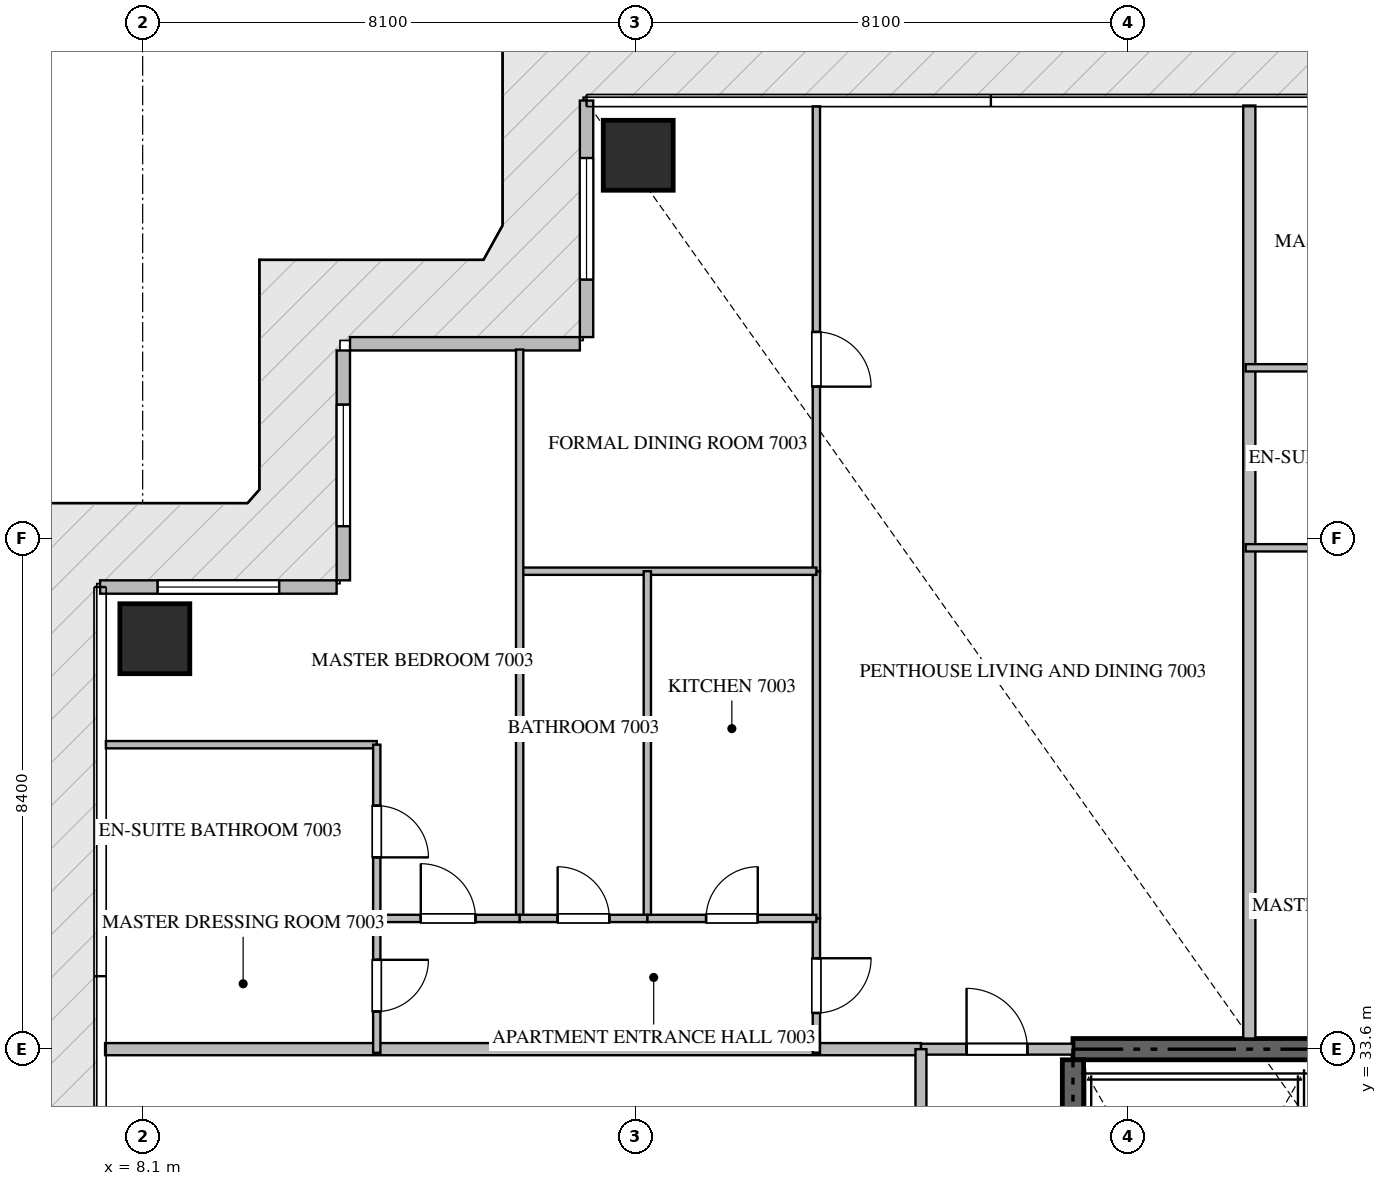
"""IFC4 building model, lengths in metres.
Left out: names, types, materials, properties, quantities, classifications, styles, units other than length and angle.
Written with IfcOpenShell. Run it as: python <this file> out.ifc"""

import sys

from ifc_helpers import new_model, si_unit, direction, frame, frame_2d, origin, origin_2d, place, context, subcontext, project, spatial, rectangle, extrude, source, transform, mapped, element, fill, save


model = new_model("IFC4")
c1 = context("Model", 3, precision=1e-05, world=origin(), true_north=direction((0.0, 1.0)))
c2 = subcontext(c1, "Body", "Model", "MODEL_VIEW")
j1 = project(units=[si_unit("LENGTHUNIT", "METRE"), si_unit("PLANEANGLEUNIT", "RADIAN")], contexts=[c1])
p1 = place(None, origin())
s1 = spatial("IfcSite", under=j1, at=p1, CompositionType="ELEMENT")
p2 = place(p1, origin())
s2 = spatial("IfcBuilding", under=s1, at=p2, CompositionType="ELEMENT")
p3 = place(p2, frame((0.0, 0.0, 279.75)))
s3 = spatial("IfcBuildingStorey", under=s2, at=p3, CompositionType="ELEMENT", Elevation=279.75)
p4 = place(p3, frame((41.4, 33.6, -0.26), z_axis=(0.0, 0.0, 1.0), x_axis=(-1.0, 0.0, 0.0)))
e1 = element("IfcWall", 1, at=p4, inside=s3, PredefinedType="SHEAR", context=c2, shape_type="SweptSolid", body=[
    extrude(rectangle(XDim=18.0, YDim=0.35, at=frame_2d((9.0, 0.0))), origin(), (0.0, 0.0, 1.0), 3.848),
])
p5 = place(p3, frame((23.4, 24.25, -0.26), z_axis=(0.0, 0.0, 1.0), x_axis=(0.0, 1.0, 0.0)))
e2 = element("IfcWall", 2, at=p5, inside=s3, PredefinedType="SHEAR", context=c2, shape_type="SweptSolid", body=[
    extrude(rectangle(XDim=9.175, YDim=0.35, at=frame_2d((4.587, 0.0))), origin(), (0.0, 0.0, 1.0), 3.848),
])
m1 = source(origin(), c2, "Body", "SweptSolid", [
    extrude(rectangle(XDim=1.15, YDim=1.15, at=origin_2d()), origin(), (0.0, 0.0, 1.0), 3.85),
])
for number, where, z_axis, x_axis in (
    (3, (16.25, 48.3, -0.26), (0.0, 0.0, 1.0), (1.0, 0.0, 0.0)),
    (4, (8.3, 40.35, -0.26), (0.0, 0.0, 1.0), (1.0, 0.0, 0.0)),
):
    element("IfcColumn", number, at=place(p3, frame(where, z_axis=z_axis, x_axis=x_axis)), inside=s3, PredefinedType="COLUMN", context=c2, shape_type="MappedRepresentation", body=[
        mapped(m1, transform((0.0, 0.0, 0.0), scale=1.0)),
    ])
p6 = place(p3, frame((15.4, 49.2, 0.0), z_axis=(0.0, 0.0, 1.0), x_axis=(0.0, -1.0, 0.0)))
e5 = element("IfcWall", 5, at=p6, inside=s3, PredefinedType="ELEMENTEDWALL", context=c2, shape_type="SweptSolid", body=[
    extrude(rectangle(XDim=3.89, YDim=0.22, at=frame_2d((1.945, 0.0))), origin(), (0.0, 0.0, 1.0), 3.575),
])
p7 = place(p6, frame((0.945, 0.0, 0.65)))
e6 = element("IfcOpeningElement", 6, at=p7, cuts=e5, PredefinedType="OPENING", context=c2, shape_type="SweptSolid", body=[
    extrude(rectangle(XDim=2.0, YDim=2.2, at=frame_2d((1.0, 1.1))), frame((0.0, 0.12, 0.0), z_axis=(0.0, -1.0, 0.0), x_axis=(1.0, 0.0, 0.0)), (0.0, 0.0, 1.0), 0.24),
])
p8 = place(p3, frame((15.29, 45.2, 0.0), z_axis=(0.0, 0.0, 1.0), x_axis=(-1.0, 0.0, 0.0)))
e7 = element("IfcWall", 7, at=p8, inside=s3, PredefinedType="ELEMENTEDWALL", context=c2, shape_type="SweptSolid", body=[
    extrude(rectangle(XDim=3.78, YDim=0.22, at=frame_2d((1.89, 0.0))), origin(), (0.0, 0.0, 1.0), 3.575),
])
p9 = place(p3, frame((11.4, 45.09, 0.0), z_axis=(0.0, 0.0, 1.0), x_axis=(0.0, -1.0, 0.0)))
e8 = element("IfcWall", 8, at=p9, inside=s3, PredefinedType="ELEMENTEDWALL", context=c2, shape_type="SweptSolid", body=[
    extrude(rectangle(XDim=3.78, YDim=0.22, at=frame_2d((1.89, 0.0))), origin(), (0.0, 0.0, 1.0), 3.575),
])
p10 = place(p9, frame((0.89, 0.0, 0.65)))
e9 = element("IfcOpeningElement", 9, at=p10, cuts=e8, PredefinedType="OPENING", context=c2, shape_type="SweptSolid", body=[
    extrude(rectangle(XDim=2.0, YDim=2.2, at=frame_2d((1.0, 1.1))), frame((0.0, 0.12, 0.0), z_axis=(0.0, -1.0, 0.0), x_axis=(1.0, 0.0, 0.0)), (0.0, 0.0, 1.0), 0.24),
])
p11 = place(p3, frame((11.29, 41.2, 0.0), z_axis=(0.0, 0.0, 1.0), x_axis=(-1.0, 0.0, 0.0)))
e10 = element("IfcWall", 10, at=p11, inside=s3, PredefinedType="ELEMENTEDWALL", context=c2, shape_type="SweptSolid", body=[
    extrude(rectangle(XDim=3.89, YDim=0.22, at=frame_2d((1.945, 0.0))), origin(), (0.0, 0.0, 1.0), 3.575),
])
p12 = place(p11, frame((0.945, 0.0, 0.65)))
e11 = element("IfcOpeningElement", 11, at=p12, cuts=e10, PredefinedType="OPENING", context=c2, shape_type="SweptSolid", body=[
    extrude(rectangle(XDim=2.0, YDim=2.2, at=frame_2d((1.0, 1.1))), frame((0.0, 0.12, 0.0), z_axis=(0.0, -1.0, 0.0), x_axis=(1.0, 0.0, 0.0)), (0.0, 0.0, 1.0), 0.24),
])
p13 = place(p3, frame((26.3, 33.775, 0.0), z_axis=(0.0, 0.0, 1.0), x_axis=(0.0, 1.0, 0.0)))
e12 = element("IfcWall", 12, at=p13, inside=s3, PredefinedType="PARTITIONING", context=c2, shape_type="SweptSolid", body=[
    extrude(rectangle(XDim=15.343, YDim=0.2, at=frame_2d((7.671, 0.0))), origin(), (0.0, 0.0, 1.0), 3.59),
])
p14 = place(p3, frame((7.482, 33.6, 0.0), z_axis=(0.0, 0.0, 1.0), x_axis=(1.0, 0.0, 0.0)))
e13 = element("IfcWall", 13, at=p14, inside=s3, PredefinedType="PARTITIONING", context=c2, shape_type="SweptSolid", body=[
    extrude(rectangle(XDim=13.418, YDim=0.2, at=frame_2d((6.709, 0.0))), origin(), (0.0, 0.0, 1.0), 3.59),
])
p15 = place(p3, frame((20.902, 33.6, 0.0), z_axis=(0.0, 0.0, 1.0), x_axis=(1.0, 0.0, 0.0)))
e14 = element("IfcWall", 14, at=p15, inside=s3, PredefinedType="PARTITIONING", context=c2, shape_type="SweptSolid", body=[
    extrude(rectangle(XDim=2.496, YDim=0.18, at=frame_2d((1.248, 0.0))), origin(), (0.0, 0.0, 1.0), 3.59),
])
p16 = place(p15, frame((0.748, 0.0, 0.0)))
e15 = element("IfcOpeningElement", 15, at=p16, cuts=e14, PredefinedType="OPENING", context=c2, shape_type="SweptSolid", body=[
    extrude(rectangle(XDim=1.0, YDim=2.15, at=frame_2d((0.5, 1.075))), frame((0.0, 0.1, 0.0), z_axis=(0.0, -1.0, 0.0), x_axis=(1.0, 0.0, 0.0)), (0.0, 0.0, 1.0), 0.2),
])
p17 = place(p3, frame((20.9, 16.8, 0.0), z_axis=(0.0, 0.0, 1.0), x_axis=(0.0, 1.0, 0.0)))
e16 = element("IfcWall", 16, at=p17, inside=s3, PredefinedType="PARTITIONING", context=c2, shape_type="SweptSolid", body=[
    extrude(rectangle(XDim=16.8, YDim=0.18, at=frame_2d((8.4, 0.0))), origin(), (0.0, 0.0, 1.0), 3.59),
])
p18 = place(p17, frame((14.5, 0.0, 0.0)))
e17 = element("IfcOpeningElement", 17, at=p18, cuts=e16, PredefinedType="OPENING", context=c2, shape_type="SweptSolid", body=[
    extrude(rectangle(XDim=1.0, YDim=2.15, at=frame_2d((0.5, 1.075))), frame((0.0, 0.1, 0.0), z_axis=(0.0, -1.0, 0.0), x_axis=(1.0, 0.0, 0.0)), (0.0, 0.0, 1.0), 0.2),
])
p19 = place(p3, frame((19.18, 35.75, 0.0), z_axis=(0.0, 0.0, 1.0), x_axis=(0.0, -1.0, 0.0)))
e18 = element("IfcWall", 18, at=p19, inside=s3, PredefinedType="PARTITIONING", context=c2, shape_type="SweptSolid", body=[
    extrude(rectangle(XDim=2.21, YDim=0.12, at=frame_2d((1.105, 0.0))), origin(), (0.0, 0.0, 1.0), 3.59),
])
p20 = place(p19, frame((0.655, 0.0, 0.0)))
e19 = element("IfcOpeningElement", 19, at=p20, cuts=e18, PredefinedType="OPENING", context=c2, shape_type="SweptSolid", body=[
    extrude(rectangle(XDim=0.9, YDim=2.1, at=frame_2d((0.45, 1.05))), frame((0.0, 0.07, 0.0), z_axis=(0.0, -1.0, 0.0), x_axis=(1.0, 0.0, 0.0)), (0.0, 0.0, 1.0), 0.14),
])
p21 = place(p3, frame((19.18, 49.105, 0.0), z_axis=(0.0, 0.0, 1.0), x_axis=(0.0, -1.0, 0.0)))
e20 = element("IfcWall", 20, at=p21, inside=s3, PredefinedType="PARTITIONING", context=c2, shape_type="SweptSolid", body=[
    extrude(rectangle(XDim=7.645, YDim=0.12, at=frame_2d((3.823, 0.0))), origin(), (0.0, 0.0, 1.0), 3.59),
])
p22 = place(p21, frame((3.71, 0.0, 0.0)))
e21 = element("IfcOpeningElement", 21, at=p22, cuts=e20, PredefinedType="OPENING", context=c2, shape_type="SweptSolid", body=[
    extrude(rectangle(XDim=0.9, YDim=2.1, at=frame_2d((0.45, 1.05))), frame((0.0, 0.07, 0.0), z_axis=(0.0, -1.0, 0.0), x_axis=(1.0, 0.0, 0.0)), (0.0, 0.0, 1.0), 0.14),
])
p23 = place(p3, frame((19.18, 41.458, 0.0), z_axis=(0.0, 0.0, 1.0), x_axis=(0.0, -1.0, 0.0)))
e22 = element("IfcWall", 22, at=p23, inside=s3, PredefinedType="PARTITIONING", context=c2, shape_type="SweptSolid", body=[
    extrude(rectangle(XDim=5.706, YDim=0.12, at=frame_2d((2.853, 0.0))), origin(), (0.0, 0.0, 1.0), 3.59),
])
p24 = place(p3, frame((14.3, 41.46, 0.0), z_axis=(0.0, 0.0, 1.0), x_axis=(1.0, 0.0, 0.0)))
e23 = element("IfcWall", 23, at=p24, inside=s3, PredefinedType="PARTITIONING", context=c2, shape_type="SweptSolid", body=[
    extrude(rectangle(XDim=4.88, YDim=0.12, at=frame_2d((2.44, 0.0))), origin(), (0.0, 0.0, 1.0), 3.59),
])
p25 = place(p3, frame((14.3, 45.105, 0.0), z_axis=(0.0, 0.0, 1.0), x_axis=(0.0, -1.0, 0.0)))
e24 = element("IfcWall", 24, at=p25, inside=s3, PredefinedType="PARTITIONING", context=c2, shape_type="SweptSolid", body=[
    extrude(rectangle(XDim=9.355, YDim=0.12, at=frame_2d((4.677, 0.0))), origin(), (0.0, 0.0, 1.0), 3.59),
])
p26 = place(p3, frame((16.4, 41.46, 0.0), z_axis=(0.0, 0.0, 1.0), x_axis=(0.0, -1.0, 0.0)))
e25 = element("IfcWall", 25, at=p26, inside=s3, PredefinedType="PARTITIONING", context=c2, shape_type="SweptSolid", body=[
    extrude(rectangle(XDim=5.71, YDim=0.12, at=frame_2d((2.855, 0.0))), origin(), (0.0, 0.0, 1.0), 3.122),
])
p27 = place(p3, frame((14.3, 35.75, 0.0), z_axis=(0.0, 0.0, 1.0), x_axis=(1.0, 0.0, 0.0)))
e26 = element("IfcWall", 26, at=p27, inside=s3, PredefinedType="PARTITIONING", context=c2, shape_type="SweptSolid", body=[
    extrude(rectangle(XDim=2.1, YDim=0.12, at=frame_2d((1.05, 0.0))), origin(), (0.0, 0.0, 1.0), 3.59),
])
p28 = place(p27, frame((0.625, 0.0, 0.0)))
e27 = element("IfcOpeningElement", 27, at=p28, cuts=e26, PredefinedType="OPENING", context=c2, shape_type="SweptSolid", body=[
    extrude(rectangle(XDim=0.85, YDim=2.1, at=frame_2d((0.425, 1.05))), frame((0.0, 0.07, 0.0), z_axis=(0.0, -1.0, 0.0), x_axis=(1.0, 0.0, 0.0)), (0.0, 0.0, 1.0), 0.14),
])
p29 = place(p3, frame((16.402, 35.75, 0.0), z_axis=(0.0, 0.0, 1.0), x_axis=(1.0, 0.0, 0.0)))
e28 = element("IfcWall", 28, at=p29, inside=s3, PredefinedType="PARTITIONING", context=c2, shape_type="SweptSolid", body=[
    extrude(rectangle(XDim=2.778, YDim=0.12, at=frame_2d((1.389, 0.0))), origin(), (0.0, 0.0, 1.0), 3.59),
])
p30 = place(p29, frame((0.964, 0.0, 0.0)))
e29 = element("IfcOpeningElement", 29, at=p30, cuts=e28, PredefinedType="OPENING", context=c2, shape_type="SweptSolid", body=[
    extrude(rectangle(XDim=0.85, YDim=2.1, at=frame_2d((0.425, 1.05))), frame((0.0, 0.07, 0.0), z_axis=(0.0, -1.0, 0.0), x_axis=(1.0, 0.0, 0.0)), (0.0, 0.0, 1.0), 0.14),
])
p31 = place(p3, frame((11.95, 35.75, 0.0), z_axis=(0.0, 0.0, 1.0), x_axis=(1.0, 0.0, 0.0)))
e30 = element("IfcWall", 30, at=p31, inside=s3, PredefinedType="PARTITIONING", context=c2, shape_type="SweptSolid", body=[
    extrude(rectangle(XDim=2.348, YDim=0.12, at=frame_2d((1.174, 0.0))), origin(), (0.0, 0.0, 1.0), 3.59),
])
p32 = place(p31, frame((0.724, 0.0, 0.0)))
e31 = element("IfcOpeningElement", 31, at=p32, cuts=e30, PredefinedType="OPENING", context=c2, shape_type="SweptSolid", body=[
    extrude(rectangle(XDim=0.9, YDim=2.1, at=frame_2d((0.45, 1.05))), frame((0.0, 0.07, 0.0), z_axis=(0.0, -1.0, 0.0), x_axis=(1.0, 0.0, 0.0)), (0.0, 0.0, 1.0), 0.14),
])
p33 = place(p3, frame((7.495, 38.607, 0.0), z_axis=(0.0, 0.0, 1.0), x_axis=(1.0, 0.0, 0.0)))
e32 = element("IfcWall", 32, at=p33, inside=s3, PredefinedType="PARTITIONING", context=c2, shape_type="SweptSolid", body=[
    extrude(rectangle(XDim=4.455, YDim=0.12, at=frame_2d((2.228, 0.0))), origin(), (0.0, 0.0, 1.0), 3.59),
])
p34 = place(p3, frame((7.495, 35.75, 0.0), z_axis=(0.0, 0.0, 1.0), x_axis=(1.0, 0.0, 0.0)))
e33 = element("IfcWall", 33, at=p34, inside=s3, PredefinedType="PARTITIONING", context=c2, shape_type="SweptSolid", body=[
    extrude(rectangle(XDim=4.453, YDim=0.12, at=frame_2d((2.227, 0.0))), origin(), (0.0, 0.0, 1.0), 3.59),
])
p35 = place(p3, frame((11.95, 38.607, 0.0), z_axis=(0.0, 0.0, 1.0), x_axis=(0.0, -1.0, 0.0)))
e34 = element("IfcWall", 34, at=p35, inside=s3, PredefinedType="PARTITIONING", context=c2, shape_type="SweptSolid", body=[
    extrude(rectangle(XDim=2.857, YDim=0.12, at=frame_2d((1.428, 0.0))), origin(), (0.0, 0.0, 1.0), 3.59),
])
p36 = place(p35, frame((1.003, 0.0, 0.0)))
e35 = element("IfcOpeningElement", 35, at=p36, cuts=e34, PredefinedType="OPENING", context=c2, shape_type="SweptSolid", body=[
    extrude(rectangle(XDim=0.85, YDim=2.1, at=frame_2d((0.425, 1.05))), frame((0.0, 0.07, 0.0), z_axis=(0.0, -1.0, 0.0), x_axis=(1.0, 0.0, 0.0)), (0.0, 0.0, 1.0), 0.14),
])
p37 = place(p3, frame((11.95, 35.748, 0.0), z_axis=(0.0, 0.0, 1.0), x_axis=(0.0, -1.0, 0.0)))
e36 = element("IfcWall", 36, at=p37, inside=s3, PredefinedType="PARTITIONING", context=c2, shape_type="SweptSolid", body=[
    extrude(rectangle(XDim=2.208, YDim=0.12, at=frame_2d((1.104, 0.0))), origin(), (0.0, 0.0, 1.0), 3.59),
])
p38 = place(p37, frame((0.679, 0.0, 0.0)))
e37 = element("IfcOpeningElement", 37, at=p38, cuts=e36, PredefinedType="OPENING", context=c2, shape_type="SweptSolid", body=[
    extrude(rectangle(XDim=0.85, YDim=2.1, at=frame_2d((0.425, 1.05))), frame((0.0, 0.07, 0.0), z_axis=(0.0, -1.0, 0.0), x_axis=(1.0, 0.0, 0.0)), (0.0, 0.0, 1.0), 0.14),
])
for number, where, z_axis, x_axis in (
    (38, (26.24, 44.805, 0.0), (0.0, 0.0, 1.0), (1.0, 0.0, 0.0)),
    (39, (26.24, 41.845, 0.0), (0.0, 0.0, 1.0), (1.0, 0.0, 0.0)),
):
    element("IfcWall", number, at=place(p3, frame(where, z_axis=z_axis, x_axis=x_axis)), inside=s3, PredefinedType="PARTITIONING", context=c2, shape_type="SweptSolid", body=[
        extrude(rectangle(XDim=4.79, YDim=0.12, at=frame_2d((2.395, 0.0))), origin(), (0.0, 0.0, 1.0), 3.59),
    ])
m2 = source(origin(), c2, "Body", "SweptSolid", [
    extrude(rectangle(XDim=2.0, YDim=2.2, at=frame_2d((1.0, 1.1))), frame((0.0, 0.03, 0.0), z_axis=(0.0, -1.0, 0.0), x_axis=(1.0, 0.0, 0.0)), (0.0, 0.0, 1.0), 0.06),
])
p39 = place(p7, origin())
e40 = element("IfcWindow", 40, at=p39, inside=s3, PartitioningType="SINGLE_PANEL", PredefinedType="WINDOW", context=c2, shape_type="MappedRepresentation", body=[
    mapped(m2, transform((0.0, 0.0, 0.0), scale=1.0)),
])
fill(e6, e40)
p40 = place(p10, origin())
e41 = element("IfcWindow", 41, at=p40, inside=s3, PartitioningType="SINGLE_PANEL", PredefinedType="WINDOW", context=c2, shape_type="MappedRepresentation", body=[
    mapped(m2, transform((0.0, 0.0, 0.0), scale=1.0)),
])
fill(e9, e41)
p41 = place(p12, origin())
e42 = element("IfcWindow", 42, at=p41, inside=s3, PartitioningType="SINGLE_PANEL", PredefinedType="WINDOW", context=c2, shape_type="MappedRepresentation", body=[
    mapped(m2, transform((0.0, 0.0, 0.0), scale=1.0)),
])
fill(e11, e42)
m3 = source(origin(), c2, "Body", "SweptSolid", [
    extrude(rectangle(XDim=1.0, YDim=2.15, at=frame_2d((0.5, 1.075))), frame((0.0, 0.025, 0.0), z_axis=(0.0, -1.0, 0.0), x_axis=(1.0, 0.0, 0.0)), (0.0, 0.0, 1.0), 0.05),
])
p42 = place(p16, origin())
e43 = element("IfcDoor", 43, at=p42, inside=s3, OperationType="SINGLE_SWING_LEFT", PredefinedType="DOOR", context=c2, shape_type="MappedRepresentation", body=[
    mapped(m3, transform((0.0, 0.0, 0.0), scale=1.0)),
])
fill(e15, e43)
m4 = source(origin(), c2, "Body", "SweptSolid", [
    extrude(rectangle(XDim=0.9, YDim=2.1, at=frame_2d((0.45, 1.05))), frame((0.0, 0.025, 0.0), z_axis=(0.0, -1.0, 0.0), x_axis=(1.0, 0.0, 0.0)), (0.0, 0.0, 1.0), 0.05),
])
p43 = place(p20, origin())
e44 = element("IfcDoor", 44, at=p43, inside=s3, OperationType="SINGLE_SWING_LEFT", PredefinedType="DOOR", context=c2, shape_type="MappedRepresentation", body=[
    mapped(m4, transform((0.0, 0.0, 0.0), scale=1.0)),
])
fill(e19, e44)
p44 = place(p22, origin())
e45 = element("IfcDoor", 45, at=p44, inside=s3, OperationType="SINGLE_SWING_RIGHT", PredefinedType="DOOR", context=c2, shape_type="MappedRepresentation", body=[
    mapped(m4, transform((0.0, 0.0, 0.0), scale=1.0)),
])
fill(e21, e45)
m5 = source(origin(), c2, "Body", "SweptSolid", [
    extrude(rectangle(XDim=0.85, YDim=2.1, at=frame_2d((0.425, 1.05))), frame((0.0, 0.025, 0.0), z_axis=(0.0, -1.0, 0.0), x_axis=(1.0, 0.0, 0.0)), (0.0, 0.0, 1.0), 0.05),
])
p45 = place(p28, origin())
e46 = element("IfcDoor", 46, at=p45, inside=s3, OperationType="SINGLE_SWING_LEFT", PredefinedType="DOOR", context=c2, shape_type="MappedRepresentation", body=[
    mapped(m5, transform((0.0, 0.0, 0.0), scale=1.0)),
])
fill(e27, e46)
p46 = place(p30, origin())
e47 = element("IfcDoor", 47, at=p46, inside=s3, OperationType="SINGLE_SWING_RIGHT", PredefinedType="DOOR", context=c2, shape_type="MappedRepresentation", body=[
    mapped(m5, transform((0.0, 0.0, 0.0), scale=1.0)),
])
fill(e29, e47)
p47 = place(p32, origin())
e48 = element("IfcDoor", 48, at=p47, inside=s3, OperationType="SINGLE_SWING_LEFT", PredefinedType="DOOR", context=c2, shape_type="MappedRepresentation", body=[
    mapped(m4, transform((0.0, 0.0, 0.0), scale=1.0)),
])
fill(e31, e48)
p48 = place(p36, origin())
e49 = element("IfcDoor", 49, at=p48, inside=s3, OperationType="SINGLE_SWING_RIGHT", PredefinedType="DOOR", context=c2, shape_type="MappedRepresentation", body=[
    mapped(m5, transform((0.0, 0.0, 0.0), scale=1.0)),
])
fill(e35, e49)
p49 = place(p38, origin())
e50 = element("IfcDoor", 50, at=p49, inside=s3, OperationType="SINGLE_SWING_LEFT", PredefinedType="DOOR", context=c2, shape_type="MappedRepresentation", body=[
    mapped(m5, transform((0.0, 0.0, 0.0), scale=1.0)),
])
fill(e37, e50)
save(model, sys.argv[1])
